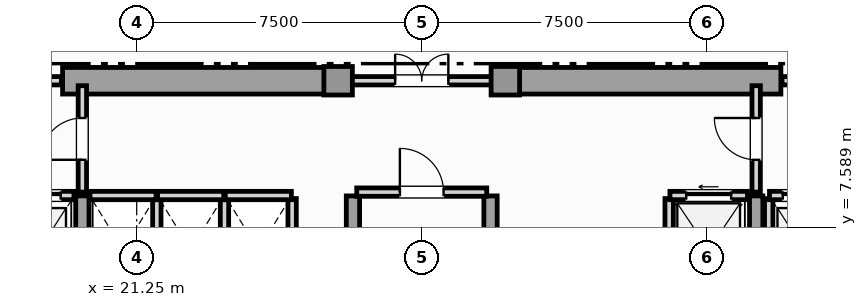
"""IFC4 building model, lengths in metres.
Left out: names, types, materials, properties, quantities, classifications, styles, units other than length and angle.
Written with IfcOpenShell. Run it as: python <this file> out.ifc"""

import sys

from ifc_helpers import new_model, si_unit, direction, frame, frame_2d, origin, origin_2d, place, context, subcontext, project, spatial, rectangle, extrude, element, fill, save


model = new_model("IFC4")
c1 = context("Model", 3, precision=1e-05, world=origin(), true_north=direction((0.0, 1.0)))
c2 = subcontext(c1, "Body", "Model", "MODEL_VIEW")
j1 = project(units=[si_unit("LENGTHUNIT", "METRE"), si_unit("PLANEANGLEUNIT", "RADIAN")], contexts=[c1])
p1 = place(None, origin())
s1 = spatial("IfcSite", under=j1, at=p1, CompositionType="ELEMENT")
p2 = place(p1, origin())
s2 = spatial("IfcBuilding", under=s1, at=p2, CompositionType="ELEMENT")
p3 = place(p2, frame((0.0, 0.0, 111.85)))
s3 = spatial("IfcBuildingStorey", under=s2, at=p3, CompositionType="ELEMENT", Elevation=111.85)
for number, where, z_axis, x_axis in (
    (1, (19.3, 11.45, 0.0), (0.0, 0.0, 1.0), (1.0, 0.0, 0.0)),
    (2, (30.9, 11.45, 0.0), (0.0, 0.0, 1.0), (1.0, 0.0, 0.0)),
):
    element("IfcWall", number, at=place(p3, frame(where, z_axis=z_axis, x_axis=x_axis)), inside=s3, PredefinedType="SHEAR", context=c2, shape_type="SweptSolid", body=[
        extrude(rectangle(XDim=7.3, YDim=0.7, at=frame_2d((3.65, 0.0))), origin(), (0.0, 0.0, 1.0), 3.6),
    ])
for number, where, z_axis, x_axis in (
    (3, (19.82, 0.92, 0.0), (0.0, 0.0, 1.0), (0.0, 1.0, 0.0)),
    (4, (26.94, 0.92, 0.0), (0.0, 0.0, 1.0), (0.0, 1.0, 0.0)),
    (5, (30.56, 0.92, 0.0), (0.0, 0.0, 1.0), (0.0, 1.0, 0.0)),
    (6, (37.55, 0.92, 0.0), (0.0, 0.0, 1.0), (0.0, 1.0, 0.0)),
):
    element("IfcWall", number, at=place(p3, frame(where, z_axis=z_axis, x_axis=x_axis)), inside=s3, PredefinedType="SHEAR", context=c2, shape_type="SweptSolid", body=[
        extrude(rectangle(XDim=7.5, YDim=0.35, at=frame_2d((3.75, 0.0))), origin(), (0.0, 0.0, 1.0), 3.6),
    ])
for number, where, z_axis, x_axis in (
    (7, (26.55, 11.45, 0.0), (0.0, 0.0, 1.0), (1.0, 0.0, 0.0)),
    (8, (30.95, 11.45, 0.0), (0.0, 0.0, 1.0), (1.0, 0.0, 0.0)),
):
    element("IfcColumn", number, at=place(p3, frame(where, z_axis=z_axis, x_axis=x_axis)), inside=s3, PredefinedType="COLUMN", context=c2, shape_type="SweptSolid", body=[
        extrude(rectangle(XDim=0.75, YDim=0.75, at=origin_2d()), origin(), (0.0, 0.0, 1.0), 3.85),
    ])
p4 = place(p3, frame((17.78, 8.43, 0.0), z_axis=(0.0, 0.0, 1.0), x_axis=(1.0, 0.0, 0.0)))
e9 = element("IfcWall", 9, at=p4, inside=s3, PredefinedType="SOLIDWALL", context=c2, shape_type="SweptSolid", body=[
    extrude(rectangle(XDim=1.82, YDim=0.22, at=frame_2d((0.91, 0.0))), origin(), (0.0, 0.0, 1.0), 3.6),
])
p5 = place(p4, frame((0.35, 0.0, 0.0)))
e10 = element("IfcOpeningElement", 10, at=p5, cuts=e9, PredefinedType="OPENING", context=c2, shape_type="SweptSolid", body=[
    extrude(rectangle(XDim=1.12, YDim=2.25, at=frame_2d((0.56, 1.125))), frame((0.0, 0.12, 0.0), z_axis=(0.0, -1.0, 0.0), x_axis=(1.0, 0.0, 0.0)), (0.0, 0.0, 1.0), 0.24),
])
p6 = place(p3, frame((37.88, 5.65, 0.0), z_axis=(0.0, 0.0, 1.0), x_axis=(0.0, 1.0, 0.0)))
e11 = element("IfcWall", 11, at=p6, inside=s3, PredefinedType="SOLIDWALL", context=c2, shape_type="SweptSolid", body=[
    extrude(rectangle(XDim=2.7, YDim=0.22, at=frame_2d((1.35, 0.0))), origin(), (0.0, 0.0, 1.0), 3.6),
])
p7 = place(p3, frame((37.9, 8.43, 0.0), z_axis=(0.0, 0.0, 1.0), x_axis=(1.0, 0.0, 0.0)))
e12 = element("IfcWall", 12, at=p7, inside=s3, PredefinedType="SOLIDWALL", context=c2, shape_type="SweptSolid", body=[
    extrude(rectangle(XDim=1.82, YDim=0.22, at=frame_2d((0.91, 0.0))), origin(), (0.0, 0.0, 1.0), 3.6),
])
p8 = place(p7, frame((0.35, 0.0, 0.0)))
e13 = element("IfcOpeningElement", 13, at=p8, cuts=e12, PredefinedType="OPENING", context=c2, shape_type="SweptSolid", body=[
    extrude(rectangle(XDim=1.12, YDim=2.25, at=frame_2d((0.56, 1.125))), frame((0.0, 0.12, 0.0), z_axis=(0.0, -1.0, 0.0), x_axis=(1.0, 0.0, 0.0)), (0.0, 0.0, 1.0), 0.24),
])
p9 = place(p3, frame((35.26, 5.65, 0.0), z_axis=(0.0, 0.0, 1.0), x_axis=(0.0, 1.0, 0.0)))
e14 = element("IfcWall", 14, at=p9, inside=s3, PredefinedType="SOLIDWALL", context=c2, shape_type="SweptSolid", body=[
    extrude(rectangle(XDim=2.7, YDim=0.22, at=frame_2d((1.35, 0.0))), origin(), (0.0, 0.0, 1.0), 3.6),
])
p10 = place(p3, frame((35.28, 8.43, 0.0), z_axis=(0.0, 0.0, 1.0), x_axis=(1.0, 0.0, 0.0)))
e15 = element("IfcWall", 15, at=p10, inside=s3, PredefinedType="SOLIDWALL", context=c2, shape_type="SweptSolid", body=[
    extrude(rectangle(XDim=2.04, YDim=0.22, at=frame_2d((1.02, 0.0))), origin(), (0.0, 0.0, 1.0), 3.6),
])
p11 = place(p10, frame((0.43, 0.0, 0.0)))
e16 = element("IfcOpeningElement", 16, at=p11, cuts=e15, PredefinedType="OPENING", context=c2, shape_type="SweptSolid", body=[
    extrude(rectangle(XDim=1.18, YDim=2.2, at=frame_2d((0.59, 1.1))), frame((0.0, 0.12, 0.0), z_axis=(0.0, -1.0, 0.0), x_axis=(1.0, 0.0, 0.0)), (0.0, 0.0, 1.0), 0.24),
])
p12 = place(p3, frame((21.78, 5.65, 0.0), z_axis=(0.0, 0.0, 1.0), x_axis=(0.0, 1.0, 0.0)))
e17 = element("IfcWall", 17, at=p12, inside=s3, PredefinedType="SOLIDWALL", context=c2, shape_type="SweptSolid", body=[
    extrude(rectangle(XDim=2.7, YDim=0.22, at=frame_2d((1.35, 0.0))), origin(), (0.0, 0.0, 1.0), 3.6),
])
p13 = place(p3, frame((20.02, 8.43, 0.0), z_axis=(0.0, 0.0, 1.0), x_axis=(1.0, 0.0, 0.0)))
e18 = element("IfcWall", 18, at=p13, inside=s3, PredefinedType="SOLIDWALL", context=c2, shape_type="SweptSolid", body=[
    extrude(rectangle(XDim=1.74, YDim=0.22, at=frame_2d((0.87, 0.0))), origin(), (0.0, 0.0, 1.0), 3.6),
])
p14 = place(p3, frame((23.56, 5.65, 0.0), z_axis=(0.0, 0.0, 1.0), x_axis=(0.0, 1.0, 0.0)))
e19 = element("IfcWall", 19, at=p14, inside=s3, PredefinedType="SOLIDWALL", context=c2, shape_type="SweptSolid", body=[
    extrude(rectangle(XDim=2.7, YDim=0.22, at=frame_2d((1.35, 0.0))), origin(), (0.0, 0.0, 1.0), 3.6),
])
p15 = place(p3, frame((21.8, 8.43, 0.0), z_axis=(0.0, 0.0, 1.0), x_axis=(1.0, 0.0, 0.0)))
e20 = element("IfcWall", 20, at=p15, inside=s3, PredefinedType="SOLIDWALL", context=c2, shape_type="SweptSolid", body=[
    extrude(rectangle(XDim=1.74, YDim=0.22, at=frame_2d((0.87, 0.0))), origin(), (0.0, 0.0, 1.0), 3.6),
])
p16 = place(p3, frame((25.34, 5.65, 0.0), z_axis=(0.0, 0.0, 1.0), x_axis=(0.0, 1.0, 0.0)))
e21 = element("IfcWall", 21, at=p16, inside=s3, PredefinedType="SOLIDWALL", context=c2, shape_type="SweptSolid", body=[
    extrude(rectangle(XDim=2.7, YDim=0.22, at=frame_2d((1.35, 0.0))), origin(), (0.0, 0.0, 1.0), 3.6),
])
p17 = place(p3, frame((23.58, 8.43, 0.0), z_axis=(0.0, 0.0, 1.0), x_axis=(1.0, 0.0, 0.0)))
e22 = element("IfcWall", 22, at=p17, inside=s3, PredefinedType="SOLIDWALL", context=c2, shape_type="SweptSolid", body=[
    extrude(rectangle(XDim=1.74, YDim=0.22, at=frame_2d((0.87, 0.0))), origin(), (0.0, 0.0, 1.0), 3.6),
])
p18 = place(p3, frame((27.04, 8.52, 0.0), z_axis=(0.0, 0.0, 1.0), x_axis=(1.0, 0.0, 0.0)))
e23 = element("IfcWall", 23, at=p18, inside=s3, PredefinedType="SOLIDWALL", context=c2, shape_type="SweptSolid", body=[
    extrude(rectangle(XDim=3.42, YDim=0.22, at=frame_2d((1.71, 0.0))), origin(), (0.0, 0.0, 1.0), 3.6),
])
p19 = place(p18, frame((1.135, 0.0, 0.0)))
e24 = element("IfcOpeningElement", 24, at=p19, cuts=e23, PredefinedType="OPENING", context=c2, shape_type="SweptSolid", body=[
    extrude(rectangle(XDim=1.15, YDim=2.2, at=frame_2d((0.575, 1.1))), frame((0.0, 0.12, 0.0), z_axis=(0.0, -1.0, 0.0), x_axis=(1.0, 0.0, 0.0)), (0.0, 0.0, 1.0), 0.24),
])
p20 = place(p3, frame((19.82, 8.52, 0.0), z_axis=(0.0, 0.0, 1.0), x_axis=(0.0, 1.0, 0.0)))
e25 = element("IfcWall", 25, at=p20, inside=s3, PredefinedType="SOLIDWALL", context=c2, shape_type="SweptSolid", body=[
    extrude(rectangle(XDim=2.8, YDim=0.22, at=frame_2d((1.4, 0.0))), origin(), (0.0, 0.0, 1.0), 3.055),
])
p21 = place(p20, frame((0.85, 0.0, 0.0)))
e26 = element("IfcOpeningElement", 26, at=p21, cuts=e25, PredefinedType="OPENING", context=c2, shape_type="SweptSolid", body=[
    extrude(rectangle(XDim=1.1, YDim=2.2, at=frame_2d((0.55, 1.1))), frame((0.0, 0.12, 0.0), z_axis=(0.0, -1.0, 0.0), x_axis=(1.0, 0.0, 0.0)), (0.0, 0.0, 1.0), 0.24),
])
p22 = place(p3, frame((37.55, 8.52, 0.0), z_axis=(0.0, 0.0, 1.0), x_axis=(0.0, 1.0, 0.0)))
e27 = element("IfcWall", 27, at=p22, inside=s3, PredefinedType="SOLIDWALL", context=c2, shape_type="SweptSolid", body=[
    extrude(rectangle(XDim=2.8, YDim=0.22, at=frame_2d((1.4, 0.0))), origin(), (0.0, 0.0, 1.0), 3.055),
])
p23 = place(p22, frame((0.85, 0.0, 0.0)))
e28 = element("IfcOpeningElement", 28, at=p23, cuts=e27, PredefinedType="OPENING", context=c2, shape_type="SweptSolid", body=[
    extrude(rectangle(XDim=1.1, YDim=2.2, at=frame_2d((0.55, 1.1))), frame((0.0, 0.12, 0.0), z_axis=(0.0, -1.0, 0.0), x_axis=(1.0, 0.0, 0.0)), (0.0, 0.0, 1.0), 0.24),
])
p24 = place(p3, frame((16.23, 11.45, 0.0), z_axis=(0.0, 0.0, 1.0), x_axis=(1.0, 0.0, 0.0)))
e29 = element("IfcWall", 29, at=p24, inside=s3, PredefinedType="SOLIDWALL", context=c2, shape_type="SweptSolid", body=[
    extrude(rectangle(XDim=3.04, YDim=0.22, at=frame_2d((1.52, 0.0))), origin(), (0.0, 0.0, 1.0), 3.6),
])
p25 = place(p24, frame((0.97, 0.0, 0.0)))
e30 = element("IfcOpeningElement", 30, at=p25, cuts=e29, PredefinedType="OPENING", context=c2, shape_type="SweptSolid", body=[
    extrude(rectangle(XDim=1.1, YDim=2.2, at=frame_2d((0.55, 1.1))), frame((0.0, 0.12, 0.0), z_axis=(0.0, -1.0, 0.0), x_axis=(1.0, 0.0, 0.0)), (0.0, 0.0, 1.0), 0.24),
])
p26 = place(p3, frame((26.63, 11.45, 0.0), z_axis=(0.0, 0.0, 1.0), x_axis=(1.0, 0.0, 0.0)))
e31 = element("IfcWall", 31, at=p26, inside=s3, PredefinedType="SOLIDWALL", context=c2, shape_type="SweptSolid", body=[
    extrude(rectangle(XDim=4.24, YDim=0.22, at=frame_2d((2.12, 0.0))), origin(), (0.0, 0.0, 1.0), 3.6),
])
p27 = place(p26, frame((1.42, 0.0, 0.0)))
e32 = element("IfcOpeningElement", 32, at=p27, cuts=e31, PredefinedType="OPENING", context=c2, shape_type="SweptSolid", body=[
    extrude(rectangle(XDim=1.4, YDim=2.2, at=frame_2d((0.7, 1.1))), frame((0.0, 0.12, 0.0), z_axis=(0.0, -1.0, 0.0), x_axis=(1.0, 0.0, 0.0)), (0.0, 0.0, 1.0), 0.24),
])
p28 = place(p3, frame((38.23, 11.45, 0.0), z_axis=(0.0, 0.0, 1.0), x_axis=(1.0, 0.0, 0.0)))
e33 = element("IfcWall", 33, at=p28, inside=s3, PredefinedType="SOLIDWALL", context=c2, shape_type="SweptSolid", body=[
    extrude(rectangle(XDim=3.04, YDim=0.22, at=frame_2d((1.52, 0.0))), origin(), (0.0, 0.0, 1.0), 3.6),
])
p29 = place(p28, frame((0.97, 0.0, 0.0)))
e34 = element("IfcOpeningElement", 34, at=p29, cuts=e33, PredefinedType="OPENING", context=c2, shape_type="SweptSolid", body=[
    extrude(rectangle(XDim=1.1, YDim=2.2, at=frame_2d((0.55, 1.1))), frame((0.0, 0.12, 0.0), z_axis=(0.0, -1.0, 0.0), x_axis=(1.0, 0.0, 0.0)), (0.0, 0.0, 1.0), 0.24),
])
p30 = place(p5, origin())
e35 = element("IfcDoor", 35, at=p30, inside=s3, OperationType="SLIDING_TO_LEFT", PredefinedType="DOOR", context=c2, shape_type="SweptSolid", body=[
    extrude(rectangle(XDim=1.12, YDim=2.25, at=frame_2d((0.56, 1.125))), frame((0.0, 0.025, 0.0), z_axis=(0.0, -1.0, 0.0), x_axis=(1.0, 0.0, 0.0)), (0.0, 0.0, 1.0), 0.05),
])
fill(e10, e35)
p31 = place(p8, origin())
e36 = element("IfcDoor", 36, at=p31, inside=s3, OperationType="SLIDING_TO_RIGHT", PredefinedType="DOOR", context=c2, shape_type="SweptSolid", body=[
    extrude(rectangle(XDim=1.12, YDim=2.25, at=frame_2d((0.56, 1.125))), frame((0.0, 0.025, 0.0), z_axis=(0.0, -1.0, 0.0), x_axis=(1.0, 0.0, 0.0)), (0.0, 0.0, 1.0), 0.05),
])
fill(e13, e36)
p32 = place(p11, origin())
e37 = element("IfcDoor", 37, at=p32, inside=s3, OperationType="SLIDING_TO_LEFT", PredefinedType="DOOR", context=c2, shape_type="SweptSolid", body=[
    extrude(rectangle(XDim=1.18, YDim=2.2, at=frame_2d((0.59, 1.1))), frame((0.0, 0.025, 0.0), z_axis=(0.0, -1.0, 0.0), x_axis=(1.0, 0.0, 0.0)), (0.0, 0.0, 1.0), 0.05),
])
fill(e16, e37)
p33 = place(p19, origin())
e38 = element("IfcDoor", 38, at=p33, inside=s3, OperationType="SINGLE_SWING_LEFT", PredefinedType="DOOR", context=c2, shape_type="SweptSolid", body=[
    extrude(rectangle(XDim=1.15, YDim=2.2, at=frame_2d((0.575, 1.1))), frame((0.0, 0.025, 0.0), z_axis=(0.0, -1.0, 0.0), x_axis=(1.0, 0.0, 0.0)), (0.0, 0.0, 1.0), 0.05),
])
fill(e24, e38)
p34 = place(p21, origin())
e39 = element("IfcDoor", 39, at=p34, inside=s3, OperationType="SINGLE_SWING_LEFT", PredefinedType="DOOR", context=c2, shape_type="SweptSolid", body=[
    extrude(rectangle(XDim=1.1, YDim=2.2, at=frame_2d((0.55, 1.1))), frame((0.0, 0.025, 0.0), z_axis=(0.0, -1.0, 0.0), x_axis=(1.0, 0.0, 0.0)), (0.0, 0.0, 1.0), 0.05),
])
fill(e26, e39)
p35 = place(p23, origin())
e40 = element("IfcDoor", 40, at=p35, inside=s3, OperationType="SINGLE_SWING_RIGHT", PredefinedType="DOOR", context=c2, shape_type="SweptSolid", body=[
    extrude(rectangle(XDim=1.1, YDim=2.2, at=frame_2d((0.55, 1.1))), frame((0.0, 0.025, 0.0), z_axis=(0.0, -1.0, 0.0), x_axis=(1.0, 0.0, 0.0)), (0.0, 0.0, 1.0), 0.05),
])
fill(e28, e40)
p36 = place(p27, origin())
e41 = element("IfcDoor", 41, at=p36, inside=s3, OperationType="DOUBLE_DOOR_SINGLE_SWING", PredefinedType="DOOR", context=c2, shape_type="SweptSolid", body=[
    extrude(rectangle(XDim=1.4, YDim=2.2, at=frame_2d((0.7, 1.1))), frame((0.0, 0.025, 0.0), z_axis=(0.0, -1.0, 0.0), x_axis=(1.0, 0.0, 0.0)), (0.0, 0.0, 1.0), 0.05),
])
fill(e32, e41)
save(model, sys.argv[1])
